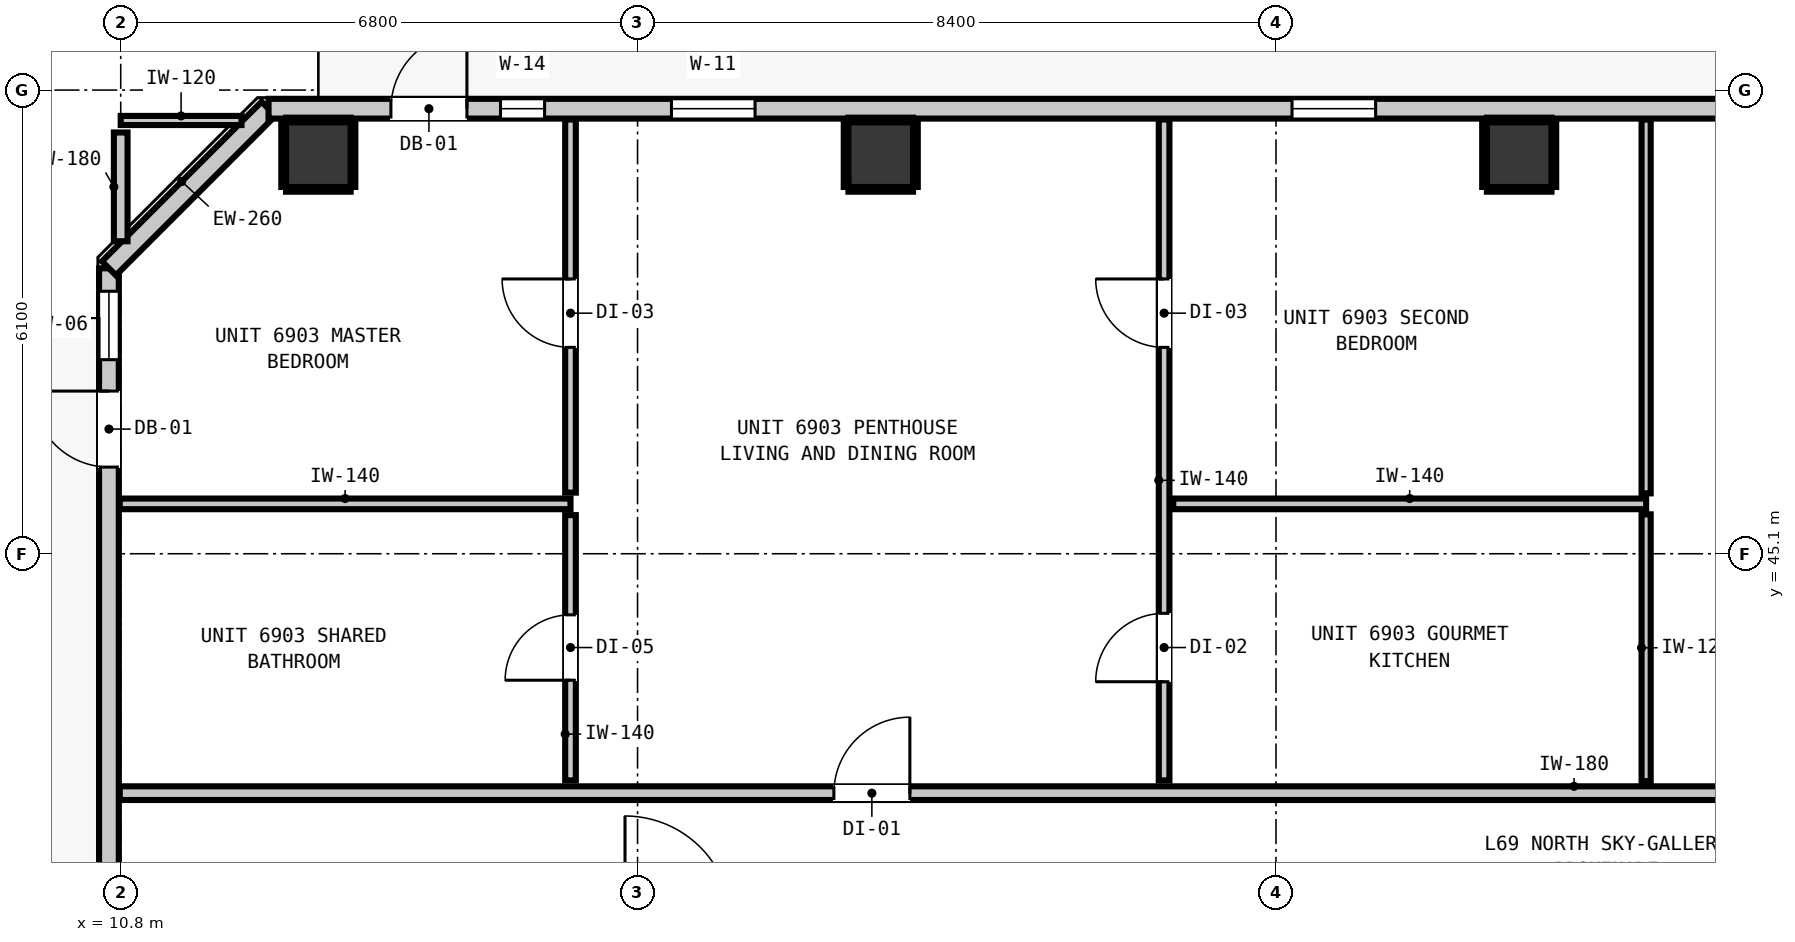
"""IFC4 building model, lengths in metres.
Left out: names, types, materials, properties, quantities, classifications, styles, units other than length and angle.
Written with IfcOpenShell. Run it as: python <this file> out.ifc"""

import sys

from ifc_helpers import new_model, si_unit, direction, frame, frame_2d, origin, origin_2d, place, context, subcontext, project, spatial, rectangle, extrude, element, fill, save


model = new_model("IFC4")
c1 = context("Model", 3, precision=1e-05, world=origin(), true_north=direction((0.0, 1.0)))
c2 = subcontext(c1, "Body", "Model", "MODEL_VIEW")
j1 = project(units=[si_unit("LENGTHUNIT", "METRE"), si_unit("PLANEANGLEUNIT", "RADIAN")], contexts=[c1])
p1 = place(None, origin())
s1 = spatial("IfcSite", under=j1, at=p1, CompositionType="ELEMENT")
p2 = place(p1, origin())
s2 = spatial("IfcBuilding", under=s1, at=p2, CompositionType="ELEMENT")
p3 = place(p2, frame((0.0, 0.0, 237.92)))
s3 = spatial("IfcBuildingStorey", under=s2, at=p3, CompositionType="ELEMENT", Elevation=237.92)
for number, where, z_axis, x_axis in (
    (1, (13.4, 50.35, 0.0), (0.0, 0.0, 1.0), (1.0, 0.0, 0.0)),
    (2, (20.8, 50.35, 0.0), (0.0, 0.0, 1.0), (1.0, 0.0, 0.0)),
    (3, (29.2, 50.35, 0.0), (0.0, 0.0, 1.0), (1.0, 0.0, 0.0)),
):
    element("IfcColumn", number, at=place(p3, frame(where, z_axis=z_axis, x_axis=x_axis)), inside=s3, PredefinedType="COLUMN", context=c2, shape_type="SweptSolid", body=[
        extrude(rectangle(XDim=0.85, YDim=0.85, at=origin_2d()), origin(), (0.0, 0.0, 1.0), 3.32),
    ])
p4 = place(p3, frame((10.645, 18.545, 0.0), z_axis=(0.0, 0.0, 1.0), x_axis=(0.0, 1.0, 0.0)))
e4 = element("IfcWall", 4, at=p4, inside=s3, PredefinedType="STANDARD", context=c2, shape_type="SweptSolid", body=[
    extrude(rectangle(XDim=30.31, YDim=0.26, at=frame_2d((15.155, 0.0))), origin(), (0.0, 0.0, 1.0), 3.1),
])
p5 = place(p4, frame((27.695, 0.0, 0.0)))
e5 = element("IfcOpeningElement", 5, at=p5, cuts=e4, PredefinedType="OPENING", context=c2, shape_type="SweptSolid", body=[
    extrude(rectangle(XDim=1.0, YDim=2.15, at=frame_2d((0.5, 1.075))), frame((0.0, 0.14, 0.0), z_axis=(0.0, -1.0, 0.0), x_axis=(1.0, 0.0, 0.0)), (0.0, 0.0, 1.0), 0.28),
])
p6 = place(p4, frame((29.108, 0.0, 0.85)))
e6 = element("IfcOpeningElement", 6, at=p6, cuts=e4, PredefinedType="OPENING", context=c2, shape_type="SweptSolid", body=[
    extrude(rectangle(XDim=0.9, YDim=1.5, at=frame_2d((0.45, 0.75))), frame((0.0, 0.14, 0.0), z_axis=(0.0, -1.0, 0.0), x_axis=(1.0, 0.0, 0.0)), (0.0, 0.0, 1.0), 0.28),
])
p7 = place(p3, frame((10.645, 48.855, 0.0), z_axis=(0.0, 0.0, 1.0), x_axis=(0.707106781187, 0.707106781187, 0.0)))
e7 = element("IfcWall", 7, at=p7, inside=s3, PredefinedType="STANDARD", context=c2, shape_type="SweptSolid", body=[
    extrude(rectangle(XDim=2.97, YDim=0.26, at=frame_2d((1.485, 0.0))), origin(), (0.0, 0.0, 1.0), 3.1),
])
p8 = place(p3, frame((12.745, 50.955, 0.0), z_axis=(0.0, 0.0, 1.0), x_axis=(1.0, 0.0, 0.0)))
e8 = element("IfcWall", 8, at=p8, inside=s3, PredefinedType="STANDARD", context=c2, shape_type="SweptSolid", body=[
    extrude(rectangle(XDim=32.71, YDim=0.26, at=frame_2d((16.355, 0.0))), origin(), (0.0, 0.0, 1.0), 3.1),
])
p9 = place(p8, frame((1.61, 0.0, 0.0)))
e9 = element("IfcOpeningElement", 9, at=p9, cuts=e8, PredefinedType="OPENING", context=c2, shape_type="SweptSolid", body=[
    extrude(rectangle(XDim=1.0, YDim=2.15, at=frame_2d((0.5, 1.075))), frame((0.0, 0.14, 0.0), z_axis=(0.0, -1.0, 0.0), x_axis=(1.0, 0.0, 0.0)), (0.0, 0.0, 1.0), 0.28),
])
p10 = place(p8, frame((5.301, 0.0, 0.85)))
e10 = element("IfcOpeningElement", 10, at=p10, cuts=e8, PredefinedType="OPENING", context=c2, shape_type="SweptSolid", body=[
    extrude(rectangle(XDim=1.1, YDim=2.05, at=frame_2d((0.55, 1.025))), frame((0.0, 0.14, 0.0), z_axis=(0.0, -1.0, 0.0), x_axis=(1.0, 0.0, 0.0)), (0.0, 0.0, 1.0), 0.28),
])
p11 = place(p8, frame((3.052, 0.0, 0.85)))
e11 = element("IfcOpeningElement", 11, at=p11, cuts=e8, PredefinedType="OPENING", context=c2, shape_type="SweptSolid", body=[
    extrude(rectangle(XDim=0.58, YDim=1.5, at=frame_2d((0.29, 0.75))), frame((0.0, 0.14, 0.0), z_axis=(0.0, -1.0, 0.0), x_axis=(1.0, 0.0, 0.0)), (0.0, 0.0, 1.0), 0.28),
])
p12 = place(p8, frame((13.466, 0.0, 0.85)))
e12 = element("IfcOpeningElement", 12, at=p12, cuts=e8, PredefinedType="OPENING", context=c2, shape_type="SweptSolid", body=[
    extrude(rectangle(XDim=1.1, YDim=2.05, at=frame_2d((0.55, 1.025))), frame((0.0, 0.14, 0.0), z_axis=(0.0, -1.0, 0.0), x_axis=(1.0, 0.0, 0.0)), (0.0, 0.0, 1.0), 0.28),
])
p13 = place(p8, frame((27.85, 0.0, 0.85)))
e13 = element("IfcOpeningElement", 13, at=p13, cuts=e8, PredefinedType="OPENING", context=c2, shape_type="SweptSolid", body=[
    extrude(rectangle(XDim=1.1, YDim=2.05, at=frame_2d((0.55, 1.025))), frame((0.0, 0.14, 0.0), z_axis=(0.0, -1.0, 0.0), x_axis=(1.0, 0.0, 0.0)), (0.0, 0.0, 1.0), 0.28),
])
p14 = place(p3, frame((10.787, 41.95, 0.0), z_axis=(0.0, 0.0, 1.0), x_axis=(1.0, 0.0, 0.0)))
e14 = element("IfcWall", 14, at=p14, inside=s3, PredefinedType="PARTITIONING", context=c2, shape_type="SweptSolid", body=[
    extrude(rectangle(XDim=36.626, YDim=0.18, at=frame_2d((18.313, 0.0))), origin(), (0.0, 0.0, 1.0), 3.1),
])
p15 = place(p14, frame((9.396, 0.0, 0.0)))
e15 = element("IfcOpeningElement", 15, at=p15, cuts=e14, PredefinedType="OPENING", context=c2, shape_type="SweptSolid", body=[
    extrude(rectangle(XDim=1.0, YDim=2.15, at=frame_2d((0.5, 1.075))), frame((0.0, 0.1, 0.0), z_axis=(0.0, -1.0, 0.0), x_axis=(1.0, 0.0, 0.0)), (0.0, 0.0, 1.0), 0.2),
])
p16 = place(p14, frame((27.874, 0.0, 0.0)))
e16 = element("IfcOpeningElement", 16, at=p16, cuts=e14, PredefinedType="OPENING", context=c2, shape_type="SweptSolid", body=[
    extrude(rectangle(XDim=0.9, YDim=2.1, at=frame_2d((0.45, 1.05))), frame((0.0, 0.1, 0.0), z_axis=(0.0, -1.0, 0.0), x_axis=(1.0, 0.0, 0.0)), (0.0, 0.0, 1.0), 0.2),
])
p17 = place(p3, frame((10.787, 45.756, 0.0), z_axis=(0.0, 0.0, 1.0), x_axis=(1.0, 0.0, 0.0)))
e17 = element("IfcWall", 17, at=p17, inside=s3, PredefinedType="PARTITIONING", context=c2, shape_type="SweptSolid", body=[
    extrude(rectangle(XDim=5.931, YDim=0.14, at=frame_2d((2.965, 0.0))), origin(), (0.0, 0.0, 1.0), 3.1),
])
p18 = place(p3, frame((24.648, 45.756, 0.0), z_axis=(0.0, 0.0, 1.0), x_axis=(1.0, 0.0, 0.0)))
e18 = element("IfcWall", 18, at=p18, inside=s3, PredefinedType="PARTITIONING", context=c2, shape_type="SweptSolid", body=[
    extrude(rectangle(XDim=6.222, YDim=0.14, at=frame_2d((3.111, 0.0))), origin(), (0.0, 0.0, 1.0), 3.1),
])
p19 = place(p3, frame((10.8, 50.8, 0.0), z_axis=(0.0, 0.0, 1.0), x_axis=(1.0, 0.0, 0.0)))
e19 = element("IfcWall", 19, at=p19, inside=s3, PredefinedType="PARTITIONING", context=c2, shape_type="SweptSolid", body=[
    extrude(rectangle(XDim=1.589, YDim=0.12, at=frame_2d((0.794, 0.0))), origin(), (0.0, 0.0, 1.0), 3.1),
])
p20 = place(p3, frame((10.8, 49.211, 0.0), z_axis=(0.0, 0.0, 1.0), x_axis=(0.0, 1.0, 0.0)))
e20 = element("IfcWall", 20, at=p20, inside=s3, PredefinedType="PARTITIONING", context=c2, shape_type="SweptSolid", body=[
    extrude(rectangle(XDim=1.431, YDim=0.18, at=frame_2d((0.716, 0.0))), origin(), (0.0, 0.0, 1.0), 3.1),
])
p21 = place(p3, frame((16.718, 42.118, 0.0), z_axis=(0.0, 0.0, 1.0), x_axis=(0.0, 1.0, 0.0)))
e21 = element("IfcWall", 21, at=p21, inside=s3, PredefinedType="PARTITIONING", context=c2, shape_type="SweptSolid", body=[
    extrude(rectangle(XDim=3.49, YDim=0.14, at=frame_2d((1.745, 0.0))), origin(), (0.0, 0.0, 1.0), 3.1),
])
p22 = place(p21, frame((1.318, 0.0, 0.0)))
e22 = element("IfcOpeningElement", 22, at=p22, cuts=e21, PredefinedType="OPENING", context=c2, shape_type="SweptSolid", body=[
    extrude(rectangle(XDim=0.86, YDim=2.02, at=frame_2d((0.43, 1.01))), frame((0.0, 0.08, 0.0), z_axis=(0.0, -1.0, 0.0), x_axis=(1.0, 0.0, 0.0)), (0.0, 0.0, 1.0), 0.16),
])
p23 = place(p3, frame((16.718, 45.904, 0.0), z_axis=(0.0, 0.0, 1.0), x_axis=(0.0, 1.0, 0.0)))
e23 = element("IfcWall", 23, at=p23, inside=s3, PredefinedType="PARTITIONING", context=c2, shape_type="SweptSolid", body=[
    extrude(rectangle(XDim=4.909, YDim=0.14, at=frame_2d((2.455, 0.0))), origin(), (0.0, 0.0, 1.0), 3.1),
])
p24 = place(p23, frame((1.911, 0.0, 0.0)))
e24 = element("IfcOpeningElement", 24, at=p24, cuts=e23, PredefinedType="OPENING", context=c2, shape_type="SweptSolid", body=[
    extrude(rectangle(XDim=0.9, YDim=2.1, at=frame_2d((0.45, 1.05))), frame((0.0, 0.08, 0.0), z_axis=(0.0, -1.0, 0.0), x_axis=(1.0, 0.0, 0.0)), (0.0, 0.0, 1.0), 0.16),
])
p25 = place(p3, frame((24.528, 42.118, 0.0), z_axis=(0.0, 0.0, 1.0), x_axis=(0.0, 1.0, 0.0)))
e25 = element("IfcWall", 25, at=p25, inside=s3, PredefinedType="PARTITIONING", context=c2, shape_type="SweptSolid", body=[
    extrude(rectangle(XDim=8.695, YDim=0.14, at=frame_2d((4.348, 0.0))), origin(), (0.0, 0.0, 1.0), 3.1),
])
p26 = place(p25, frame((1.298, 0.0, 0.0)))
e26 = element("IfcOpeningElement", 26, at=p26, cuts=e25, PredefinedType="OPENING", context=c2, shape_type="SweptSolid", body=[
    extrude(rectangle(XDim=0.9, YDim=2.1, at=frame_2d((0.45, 1.05))), frame((0.0, 0.08, 0.0), z_axis=(0.0, -1.0, 0.0), x_axis=(1.0, 0.0, 0.0)), (0.0, 0.0, 1.0), 0.16),
])
p27 = place(p25, frame((5.697, 0.0, 0.0)))
e27 = element("IfcOpeningElement", 27, at=p27, cuts=e25, PredefinedType="OPENING", context=c2, shape_type="SweptSolid", body=[
    extrude(rectangle(XDim=0.9, YDim=2.1, at=frame_2d((0.45, 1.05))), frame((0.0, 0.08, 0.0), z_axis=(0.0, -1.0, 0.0), x_axis=(1.0, 0.0, 0.0)), (0.0, 0.0, 1.0), 0.16),
])
p28 = place(p3, frame((30.87, 42.108, 0.0), z_axis=(0.0, 0.0, 1.0), x_axis=(0.0, 1.0, 0.0)))
e28 = element("IfcWall", 28, at=p28, inside=s3, PredefinedType="PARTITIONING", context=c2, shape_type="SweptSolid", body=[
    extrude(rectangle(XDim=3.51, YDim=0.12, at=frame_2d((1.755, 0.0))), origin(), (0.0, 0.0, 1.0), 3.1),
])
p29 = place(p3, frame((30.87, 45.894, 0.0), z_axis=(0.0, 0.0, 1.0), x_axis=(0.0, 1.0, 0.0)))
e29 = element("IfcWall", 29, at=p29, inside=s3, PredefinedType="PARTITIONING", context=c2, shape_type="SweptSolid", body=[
    extrude(rectangle(XDim=4.919, YDim=0.12, at=frame_2d((2.459, 0.0))), origin(), (0.0, 0.0, 1.0), 3.1),
])
for number, where, z_axis, x_axis in (
    (30, (12.975, 49.893, 0.0), (0.0, 0.0, 1.0), (1.0, 0.0, 0.0)),
    (31, (12.975, 50.807, 0.0), (0.0, 0.0, 1.0), (1.0, 0.0, 0.0)),
    (32, (12.943, 49.925, 0.0), (0.0, 0.0, 1.0), (0.0, 1.0, 0.0)),
    (33, (13.857, 49.925, 0.0), (0.0, 0.0, 1.0), (0.0, 1.0, 0.0)),
):
    element("IfcWall", number, at=place(p3, frame(where, z_axis=z_axis, x_axis=x_axis)), inside=s3, PredefinedType="PARTITIONING", context=c2, shape_type="SweptSolid", body=[
        extrude(rectangle(XDim=0.85, YDim=0.06, at=frame_2d((0.425, 0.0))), origin(), (0.0, 0.0, 1.0), 1.45),
    ])
for number, where, z_axis, x_axis in (
    (34, (20.375, 49.893, 0.0), (0.0, 0.0, 1.0), (1.0, 0.0, 0.0)),
    (35, (20.375, 50.807, 0.0), (0.0, 0.0, 1.0), (1.0, 0.0, 0.0)),
):
    element("IfcWall", number, at=place(p3, frame(where, z_axis=z_axis, x_axis=x_axis)), inside=s3, PredefinedType="PARTITIONING", context=c2, shape_type="SweptSolid", body=[
        extrude(rectangle(XDim=0.85, YDim=0.06, at=frame_2d((0.425, 0.0))), origin(), (0.0, 0.0, 1.0), 1.45),
    ])
for number, where, z_axis, x_axis in (
    (36, (20.343, 49.925, 0.0), (0.0, 0.0, 1.0), (0.0, 1.0, 0.0)),
    (37, (21.257, 49.925, 0.0), (0.0, 0.0, 1.0), (0.0, 1.0, 0.0)),
):
    element("IfcWall", number, at=place(p3, frame(where, z_axis=z_axis, x_axis=x_axis)), inside=s3, PredefinedType="PARTITIONING", context=c2, shape_type="SweptSolid", body=[
        extrude(rectangle(XDim=0.85, YDim=0.06, at=frame_2d((0.425, 0.0))), origin(), (0.0, 0.0, 1.0), 1.45),
    ])
for number, where, z_axis, x_axis in (
    (38, (28.775, 49.893, 0.0), (0.0, 0.0, 1.0), (1.0, 0.0, 0.0)),
    (39, (28.775, 50.807, 0.0), (0.0, 0.0, 1.0), (1.0, 0.0, 0.0)),
):
    element("IfcWall", number, at=place(p3, frame(where, z_axis=z_axis, x_axis=x_axis)), inside=s3, PredefinedType="PARTITIONING", context=c2, shape_type="SweptSolid", body=[
        extrude(rectangle(XDim=0.85, YDim=0.06, at=frame_2d((0.425, 0.0))), origin(), (0.0, 0.0, 1.0), 1.45),
    ])
for number, where, z_axis, x_axis in (
    (40, (28.743, 49.925, 0.0), (0.0, 0.0, 1.0), (0.0, 1.0, 0.0)),
    (41, (29.657, 49.925, 0.0), (0.0, 0.0, 1.0), (0.0, 1.0, 0.0)),
):
    element("IfcWall", number, at=place(p3, frame(where, z_axis=z_axis, x_axis=x_axis)), inside=s3, PredefinedType="PARTITIONING", context=c2, shape_type="SweptSolid", body=[
        extrude(rectangle(XDim=0.85, YDim=0.06, at=frame_2d((0.425, 0.0))), origin(), (0.0, 0.0, 1.0), 1.45),
    ])
p30 = place(p9, origin())
e42 = element("IfcDoor", 42, at=p30, inside=s3, OperationType="SINGLE_SWING_RIGHT", PredefinedType="DOOR", context=c2, shape_type="SweptSolid", body=[
    extrude(rectangle(XDim=1.0, YDim=2.15, at=frame_2d((0.5, 1.075))), frame((0.0, 0.025, 0.0), z_axis=(0.0, -1.0, 0.0), x_axis=(1.0, 0.0, 0.0)), (0.0, 0.0, 1.0), 0.05),
])
fill(e9, e42)
p31 = place(p5, origin())
e43 = element("IfcDoor", 43, at=p31, inside=s3, OperationType="SINGLE_SWING_RIGHT", PredefinedType="DOOR", context=c2, shape_type="SweptSolid", body=[
    extrude(rectangle(XDim=1.0, YDim=2.15, at=frame_2d((0.5, 1.075))), frame((0.0, 0.025, 0.0), z_axis=(0.0, -1.0, 0.0), x_axis=(1.0, 0.0, 0.0)), (0.0, 0.0, 1.0), 0.05),
])
fill(e5, e43)
p32 = place(p6, origin())
e44 = element("IfcWindow", 44, at=p32, inside=s3, PartitioningType="SINGLE_PANEL", PredefinedType="WINDOW", context=c2, shape_type="SweptSolid", body=[
    extrude(rectangle(XDim=0.9, YDim=1.5, at=frame_2d((0.45, 0.75))), frame((0.0, 0.03, 0.0), z_axis=(0.0, -1.0, 0.0), x_axis=(1.0, 0.0, 0.0)), (0.0, 0.0, 1.0), 0.06),
])
fill(e6, e44)
p33 = place(p10, origin())
e45 = element("IfcWindow", 45, at=p33, inside=s3, PartitioningType="SINGLE_PANEL", PredefinedType="WINDOW", context=c2, shape_type="SweptSolid", body=[
    extrude(rectangle(XDim=1.1, YDim=2.05, at=frame_2d((0.55, 1.025))), frame((0.0, 0.03, 0.0), z_axis=(0.0, -1.0, 0.0), x_axis=(1.0, 0.0, 0.0)), (0.0, 0.0, 1.0), 0.06),
])
fill(e10, e45)
p34 = place(p11, origin())
e46 = element("IfcWindow", 46, at=p34, inside=s3, PartitioningType="SINGLE_PANEL", PredefinedType="WINDOW", context=c2, shape_type="SweptSolid", body=[
    extrude(rectangle(XDim=0.58, YDim=1.5, at=frame_2d((0.29, 0.75))), frame((0.0, 0.03, 0.0), z_axis=(0.0, -1.0, 0.0), x_axis=(1.0, 0.0, 0.0)), (0.0, 0.0, 1.0), 0.06),
])
fill(e11, e46)
p35 = place(p12, origin())
e47 = element("IfcWindow", 47, at=p35, inside=s3, PartitioningType="SINGLE_PANEL", PredefinedType="WINDOW", context=c2, shape_type="SweptSolid", body=[
    extrude(rectangle(XDim=1.1, YDim=2.05, at=frame_2d((0.55, 1.025))), frame((0.0, 0.03, 0.0), z_axis=(0.0, -1.0, 0.0), x_axis=(1.0, 0.0, 0.0)), (0.0, 0.0, 1.0), 0.06),
])
fill(e12, e47)
p36 = place(p15, origin())
e48 = element("IfcDoor", 48, at=p36, inside=s3, OperationType="SINGLE_SWING_RIGHT", PredefinedType="DOOR", context=c2, shape_type="SweptSolid", body=[
    extrude(rectangle(XDim=1.0, YDim=2.15, at=frame_2d((0.5, 1.075))), frame((0.0, 0.025, 0.0), z_axis=(0.0, -1.0, 0.0), x_axis=(1.0, 0.0, 0.0)), (0.0, 0.0, 1.0), 0.05),
])
fill(e15, e48)
p37 = place(p22, origin())
e49 = element("IfcDoor", 49, at=p37, inside=s3, OperationType="SINGLE_SWING_LEFT", PredefinedType="DOOR", context=c2, shape_type="SweptSolid", body=[
    extrude(rectangle(XDim=0.86, YDim=2.02, at=frame_2d((0.43, 1.01))), frame((0.0, 0.025, 0.0), z_axis=(0.0, -1.0, 0.0), x_axis=(1.0, 0.0, 0.0)), (0.0, 0.0, 1.0), 0.05),
])
fill(e22, e49)
p38 = place(p24, origin())
e50 = element("IfcDoor", 50, at=p38, inside=s3, OperationType="SINGLE_SWING_RIGHT", PredefinedType="DOOR", context=c2, shape_type="SweptSolid", body=[
    extrude(rectangle(XDim=0.9, YDim=2.1, at=frame_2d((0.45, 1.05))), frame((0.0, 0.025, 0.0), z_axis=(0.0, -1.0, 0.0), x_axis=(1.0, 0.0, 0.0)), (0.0, 0.0, 1.0), 0.05),
])
fill(e24, e50)
p39 = place(p26, origin())
e51 = element("IfcDoor", 51, at=p39, inside=s3, OperationType="SINGLE_SWING_LEFT", PredefinedType="DOOR", context=c2, shape_type="SweptSolid", body=[
    extrude(rectangle(XDim=0.9, YDim=2.1, at=frame_2d((0.45, 1.05))), frame((0.0, 0.025, 0.0), z_axis=(0.0, -1.0, 0.0), x_axis=(1.0, 0.0, 0.0)), (0.0, 0.0, 1.0), 0.05),
])
fill(e26, e51)
p40 = place(p27, origin())
e52 = element("IfcDoor", 52, at=p40, inside=s3, OperationType="SINGLE_SWING_RIGHT", PredefinedType="DOOR", context=c2, shape_type="SweptSolid", body=[
    extrude(rectangle(XDim=0.9, YDim=2.1, at=frame_2d((0.45, 1.05))), frame((0.0, 0.025, 0.0), z_axis=(0.0, -1.0, 0.0), x_axis=(1.0, 0.0, 0.0)), (0.0, 0.0, 1.0), 0.05),
])
fill(e27, e52)
save(model, sys.argv[1])
